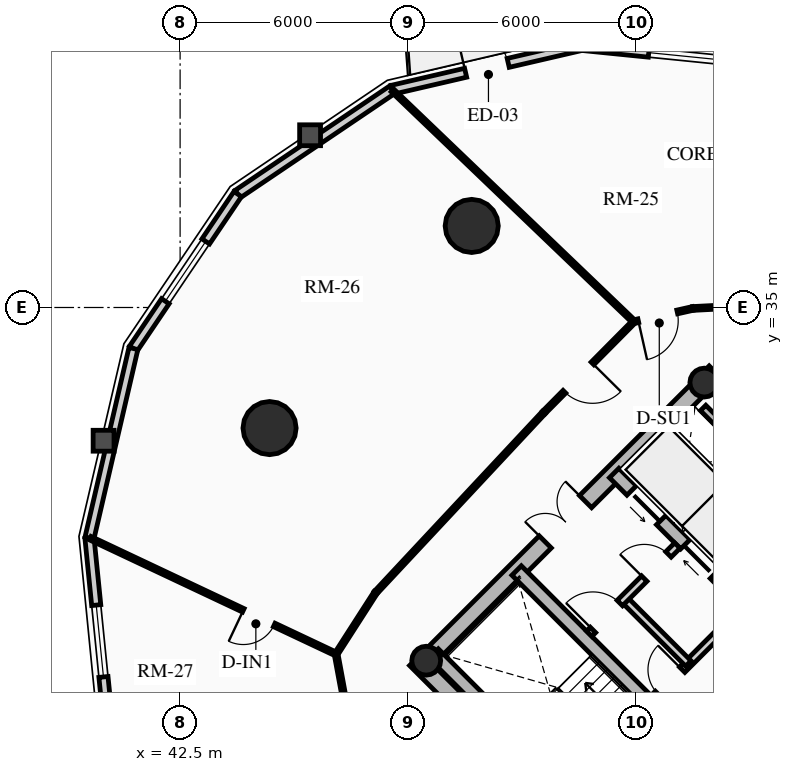
"""IFC4 building model, lengths in metres.
Left out: names, types, materials, properties, quantities, classifications, styles, units other than length and angle.
Written with IfcOpenShell. Run it as: python <this file> out.ifc"""

import sys

from ifc_helpers import new_model, si_unit, direction, frame, frame_2d, origin, origin_2d, place, context, subcontext, project, spatial, rectangle, circle, hollow_circle, extrude, source, transform, mapped, element, fill, save


model = new_model("IFC4")
c1 = context("Model", 3, precision=1e-05, world=origin(), true_north=direction((0.0, 1.0)))
c2 = subcontext(c1, "Body", "Model", "MODEL_VIEW")
j1 = project(units=[si_unit("LENGTHUNIT", "METRE"), si_unit("PLANEANGLEUNIT", "RADIAN")], contexts=[c1])
p1 = place(None, origin())
s1 = spatial("IfcSite", under=j1, at=p1, CompositionType="ELEMENT")
p2 = place(p1, origin())
s2 = spatial("IfcBuilding", under=s1, at=p2, CompositionType="ELEMENT")
p3 = place(p2, frame((0.0, 0.0, 96.34)))
s3 = spatial("IfcBuildingStorey", under=s2, at=p3, CompositionType="ELEMENT", Elevation=96.34)
for number, where, z_axis, x_axis in (
    (1, (58.737, 15.697, 0.0), (0.0, 0.0, 1.0), (-0.707, 0.707, 0.0)),
    (2, (66.303, 23.263, 0.0), (0.0, 0.0, 1.0), (-0.707, 0.707, 0.0)),
):
    element("IfcWall", number, at=place(p3, frame(where, z_axis=z_axis, x_axis=x_axis)), inside=s3, PredefinedType="SHEAR", context=c2, shape_type="SweptSolid", body=[
        extrude(rectangle(XDim=14.2, YDim=0.45, at=frame_2d((7.1, 0.0))), origin(), (0.0, 0.0, 1.0), 2.91),
    ])
p4 = place(p3, frame((48.856, 25.578, 0.0), z_axis=(0.0, 0.0, 1.0), x_axis=(0.707106781187, 0.707106781187, 0.0)))
e3 = element("IfcWall", 3, at=p4, inside=s3, PredefinedType="SHEAR", context=c2, shape_type="SweptSolid", body=[
    extrude(rectangle(XDim=10.7, YDim=0.45, at=frame_2d((5.35, 0.0))), origin(), (0.0, 0.0, 1.0), 2.91),
])
m1 = source(origin(), c2, "Body", "SweptSolid", [
    extrude(rectangle(XDim=1.5, YDim=2.02, at=frame_2d((0.75, 1.01))), frame((0.0, 0.235, 0.0), z_axis=(0.0, -1.0, 0.0), x_axis=(1.0, 0.0, 0.0)), (0.0, 0.0, 1.0), 0.47),
])
p5 = place(p4, frame((4.6, 0.0, 0.0)))
e4 = element("IfcOpeningElement", 4, at=p5, cuts=e3, PredefinedType="OPENING", context=c2, shape_type="MappedRepresentation", body=[
    mapped(m1, transform((0.0, 0.0, 0.0), x_axis=(1.0, 0.0, 0.0), y_axis=(0.0, 1.0, 0.0), z_axis=(0.0, 0.0, 1.0), scale=1.0)),
])
p6 = place(p3, frame((61.078, 18.355, 0.0), z_axis=(0.0, 0.0, 1.0), x_axis=(-0.707106781187, 0.707106781187, 0.0)))
e5 = element("IfcWall", 5, at=p6, inside=s3, PredefinedType="SHEAR", context=c2, shape_type="SweptSolid", body=[
    extrude(rectangle(XDim=13.75, YDim=0.35, at=frame_2d((6.875, 0.0))), origin(), (0.0, 0.0, 1.0), 2.91),
])
m2 = source(origin(), c2, "Body", "SweptSolid", [
    extrude(rectangle(XDim=1.1, YDim=2.015, at=frame_2d((0.55, 1.007))), frame((0.0, 0.185, 0.0), z_axis=(0.0, -1.0, 0.0), x_axis=(1.0, 0.0, 0.0)), (0.0, 0.0, 1.0), 0.37),
])
p7 = place(p6, frame((4.875, 0.0, 0.0)))
e6 = element("IfcOpeningElement", 6, at=p7, cuts=e5, PredefinedType="OPENING", context=c2, shape_type="MappedRepresentation", body=[
    mapped(m2, transform((0.0, 0.0, 0.0), x_axis=(1.0, 0.0, 0.0), y_axis=(0.0, 1.0, 0.0), z_axis=(0.0, 0.0, 1.0), scale=1.0)),
])
m3 = source(origin(), c2, "Body", "SweptSolid", [
    extrude(rectangle(XDim=1.15, YDim=2.02, at=frame_2d((0.575, 1.01))), frame((0.0, 0.185, 0.0), z_axis=(0.0, -1.0, 0.0), x_axis=(1.0, 0.0, 0.0)), (0.0, 0.0, 1.0), 0.37),
])
p8 = place(p6, frame((7.295, 0.0, 0.0)))
e7 = element("IfcOpeningElement", 7, at=p8, cuts=e5, PredefinedType="OPENING", context=c2, shape_type="MappedRepresentation", body=[
    mapped(m3, transform((0.0, 0.0, 0.0), x_axis=(1.0, 0.0, 0.0), y_axis=(0.0, 1.0, 0.0), z_axis=(0.0, 0.0, 1.0), scale=1.0)),
])
p9 = place(p3, frame((63.645, 20.922, 0.0), z_axis=(0.0, 0.0, 1.0), x_axis=(-0.707106781187, 0.707106781187, 0.0)))
e8 = element("IfcWall", 8, at=p9, inside=s3, PredefinedType="SHEAR", context=c2, shape_type="SweptSolid", body=[
    extrude(rectangle(XDim=13.75, YDim=0.35, at=frame_2d((6.875, 0.0))), origin(), (0.0, 0.0, 1.0), 2.91),
])
p10 = place(p9, frame((10.0, 0.0, 0.0)))
e9 = element("IfcOpeningElement", 9, at=p10, cuts=e8, PredefinedType="OPENING", context=c2, shape_type="MappedRepresentation", body=[
    mapped(m2, transform((0.0, 0.0, 0.0), x_axis=(1.0, 0.0, 0.0), y_axis=(0.0, 1.0, 0.0), z_axis=(0.0, 0.0, 1.0), scale=1.0)),
])
p11 = place(p9, frame((12.0, 0.0, 0.0)))
e10 = element("IfcOpeningElement", 10, at=p11, cuts=e8, PredefinedType="OPENING", context=c2, shape_type="MappedRepresentation", body=[
    mapped(m2, transform((0.0, 0.0, 0.0), x_axis=(1.0, 0.0, 0.0), y_axis=(0.0, 1.0, 0.0), z_axis=(0.0, 0.0, 1.0), scale=1.0)),
])
p12 = place(p9, frame((5.305, 0.0, 0.0)))
e11 = element("IfcOpeningElement", 11, at=p12, cuts=e8, PredefinedType="OPENING", context=c2, shape_type="MappedRepresentation", body=[
    mapped(m3, transform((0.0, 0.0, 0.0), x_axis=(1.0, 0.0, 0.0), y_axis=(0.0, 1.0, 0.0), z_axis=(0.0, 0.0, 1.0), scale=1.0)),
])
p13 = place(p3, frame((53.922, 21.141, 0.0), z_axis=(0.0, 0.0, 1.0), x_axis=(-0.707088616009, 0.707124945897, 0.0)))
e12 = element("IfcWall", 12, at=p13, inside=s3, PredefinedType="SHEAR", context=c2, shape_type="SweptSolid", body=[
    extrude(rectangle(XDim=6.72, YDim=0.35, at=frame_2d((3.36, 0.0))), origin(), (0.0, 0.0, 1.0), 2.91),
])
for number, where, z_axis, x_axis in (
    (13, (48.976, 25.706, 0.0), (0.0, 0.0, 1.0), (0.707, 0.707, 0.0)),
    (14, (56.294, 33.024, 0.0), (0.0, 0.0, 1.0), (0.707, 0.707, 0.0)),
):
    element("IfcColumn", number, at=place(p3, frame(where, z_axis=z_axis, x_axis=x_axis)), inside=s3, PredefinedType="COLUMN", context=c2, shape_type="SweptSolid", body=[
        extrude(hollow_circle(Radius=0.38, WallThickness=0.032, at=origin_2d()), origin(), (0.0, 0.0, 1.0), 2.91),
    ])
for number, where, z_axis, x_axis in (
    (15, (50.173, 37.146, 0.0), (0.0, 0.0, 1.0), (1.0, 0.0, 0.0)),
    (16, (44.854, 31.827, 0.0), (0.0, 0.0, 1.0), (1.0, 0.0, 0.0)),
):
    element("IfcColumn", number, at=place(p3, frame(where, z_axis=z_axis, x_axis=x_axis)), inside=s3, PredefinedType="USERDEFINED", context=c2, shape_type="SweptSolid", body=[
        extrude(circle(Radius=0.7, at=origin_2d()), origin(), (0.0, 0.0, 1.0), 2.91),
    ])
p14 = place(p3, frame((53.067, 41.885, 0.0), z_axis=(0.0, 0.0, 1.0), x_axis=(0.994971754311, -0.10015591906, 0.0)))
e17 = element("IfcWall", 17, at=p14, inside=s3, PredefinedType="SOLIDWALL", context=c2, shape_type="SweptSolid", body=[
    extrude(rectangle(XDim=5.448, YDim=0.24, at=frame_2d((2.724, 0.0))), origin(), (0.0, 0.0, 1.0), 2.179),
])
m4 = source(origin(), c2, "Body", "SweptSolid", [
    extrude(rectangle(XDim=1.9, YDim=1.35, at=frame_2d((0.95, 0.675))), frame((0.0, 0.13, 0.0), z_axis=(0.0, -1.0, 0.0), x_axis=(1.0, 0.0, 0.0)), (0.0, 0.0, 1.0), 0.26),
])
p15 = place(p14, frame((1.774, 0.0, 0.65)))
e18 = element("IfcOpeningElement", 18, at=p15, cuts=e17, PredefinedType="OPENING", context=c2, shape_type="MappedRepresentation", body=[
    mapped(m4, transform((0.0, 0.0, 0.0), x_axis=(1.0, 0.0, 0.0), y_axis=(0.0, 1.0, 0.0), z_axis=(0.0, 0.0, 1.0), scale=1.0)),
])
p16 = place(p3, frame((48.08, 40.729, 0.0), z_axis=(0.0, 0.0, 1.0), x_axis=(0.974165631126, 0.225834725257, 0.0)))
e19 = element("IfcWall", 19, at=p16, inside=s3, PredefinedType="SOLIDWALL", context=c2, shape_type="SweptSolid", body=[
    extrude(rectangle(XDim=5.119, YDim=0.24, at=frame_2d((2.56, 0.0))), origin(), (0.0, 0.0, 1.0), 2.179),
])
m5 = source(origin(), c2, "Body", "SweptSolid", [
    extrude(rectangle(XDim=1.15, YDim=2.005, at=frame_2d((0.575, 1.002))), frame((0.0, 0.13, 0.0), z_axis=(0.0, -1.0, 0.0), x_axis=(1.0, 0.0, 0.0)), (0.0, 0.0, 1.0), 0.26),
])
p17 = place(p16, frame((1.984, 0.0, 0.0)))
e20 = element("IfcOpeningElement", 20, at=p17, cuts=e19, PredefinedType="OPENING", context=c2, shape_type="MappedRepresentation", body=[
    mapped(m5, transform((0.0, 0.0, 0.0), x_axis=(1.0, 0.0, 0.0), y_axis=(0.0, 1.0, 0.0), z_axis=(0.0, 0.0, 1.0), scale=1.0)),
])
p18 = place(p3, frame((44.015, 37.985, 0.0), z_axis=(0.0, 0.0, 1.0), x_axis=(0.828781148131, 0.559572880421, 0.0)))
e21 = element("IfcWall", 21, at=p18, inside=s3, PredefinedType="SOLIDWALL", context=c2, shape_type="SweptSolid", body=[
    extrude(rectangle(XDim=4.905, YDim=0.24, at=frame_2d((2.452, 0.0))), origin(), (0.0, 0.0, 1.0), 2.179),
])
p19 = place(p3, frame((41.271, 33.92, 0.0), z_axis=(0.0, 0.0, 1.0), x_axis=(0.559572880421, 0.828781148131, 0.0)))
e22 = element("IfcWall", 22, at=p19, inside=s3, PredefinedType="SOLIDWALL", context=c2, shape_type="SweptSolid", body=[
    extrude(rectangle(XDim=4.905, YDim=0.24, at=frame_2d((2.452, 0.0))), origin(), (0.0, 0.0, 1.0), 2.179),
])
p20 = place(p19, frame((1.502, 0.0, 0.65)))
e23 = element("IfcOpeningElement", 23, at=p20, cuts=e22, PredefinedType="OPENING", context=c2, shape_type="MappedRepresentation", body=[
    mapped(m4, transform((0.0, 0.0, 0.0), x_axis=(1.0, 0.0, 0.0), y_axis=(0.0, 1.0, 0.0), z_axis=(0.0, 0.0, 1.0), scale=1.0)),
])
p21 = place(p3, frame((40.115, 28.933, 0.0), z_axis=(0.0, 0.0, 1.0), x_axis=(0.225834725257, 0.974165631126, 0.0)))
e24 = element("IfcWall", 24, at=p21, inside=s3, PredefinedType="SOLIDWALL", context=c2, shape_type="SweptSolid", body=[
    extrude(rectangle(XDim=5.119, YDim=0.24, at=frame_2d((2.56, 0.0))), origin(), (0.0, 0.0, 1.0), 2.179),
])
p22 = place(p3, frame((40.661, 23.513, 0.0), z_axis=(0.0, 0.0, 1.0), x_axis=(-0.10015591906, 0.994971754311, 0.0)))
e25 = element("IfcWall", 25, at=p22, inside=s3, PredefinedType="SOLIDWALL", context=c2, shape_type="SweptSolid", body=[
    extrude(rectangle(XDim=5.448, YDim=0.24, at=frame_2d((2.724, 0.0))), origin(), (0.0, 0.0, 1.0), 2.179),
])
p23 = place(p22, frame((1.774, 0.0, 0.65)))
e26 = element("IfcOpeningElement", 26, at=p23, cuts=e25, PredefinedType="OPENING", context=c2, shape_type="MappedRepresentation", body=[
    mapped(m4, transform((0.0, 0.0, 0.0), x_axis=(1.0, 0.0, 0.0), y_axis=(0.0, 1.0, 0.0), z_axis=(0.0, 0.0, 1.0), scale=1.0)),
])
p24 = place(p3, frame((55.615, 29.227, 0.0), z_axis=(0.0, 0.0, 1.0), x_axis=(0.707147878904, 0.70706568108, 0.0)))
e27 = element("IfcWall", 27, at=p24, inside=s3, PredefinedType="SHEAR", context=c2, shape_type="SweptSolid", body=[
    extrude(rectangle(XDim=2.97, YDim=0.2, at=frame_2d((1.485, 0.0))), origin(), (0.0, 0.0, 1.0), 2.91),
])
p25 = place(p3, frame((57.419, 31.2, 0.0), z_axis=(0.0, 0.0, 1.0), x_axis=(-0.707032117043, 0.707181437447, 0.0)))
e28 = element("IfcWall", 28, at=p25, inside=s3, PredefinedType="SHEAR", context=c2, shape_type="SweptSolid", body=[
    extrude(rectangle(XDim=1.635, YDim=0.2, at=frame_2d((0.817, 0.0))), origin(), (0.0, 0.0, 1.0), 2.91),
])
p26 = place(p3, frame((54.961, 24.719, 0.0), z_axis=(0.0, 0.0, 1.0), x_axis=(0.707106781187, 0.707106781187, 0.0)))
e29 = element("IfcWall", 29, at=p26, inside=s3, PredefinedType="PARTITIONING", context=c2, shape_type="SweptSolid", body=[
    extrude(rectangle(XDim=3.28, YDim=0.2, at=frame_2d((1.64, 0.0))), origin(), (0.0, 0.0, 1.0), 2.655),
])
m6 = source(origin(), c2, "Body", "SweptSolid", [
    extrude(rectangle(XDim=0.9, YDim=2.005, at=frame_2d((0.45, 1.002))), frame((0.0, 0.11, 0.0), z_axis=(0.0, -1.0, 0.0), x_axis=(1.0, 0.0, 0.0)), (0.0, 0.0, 1.0), 0.22),
])
p27 = place(p26, frame((0.16, 0.0, 0.0)))
e30 = element("IfcOpeningElement", 30, at=p27, cuts=e29, PredefinedType="OPENING", context=c2, shape_type="MappedRepresentation", body=[
    mapped(m6, transform((0.0, 0.0, 0.0), x_axis=(1.0, 0.0, 0.0), y_axis=(0.0, 1.0, 0.0), z_axis=(0.0, 0.0, 1.0), scale=1.0)),
])
p28 = place(p3, frame((55.874, 25.631, 0.0), z_axis=(0.0, 0.0, 1.0), x_axis=(-0.707157639372, 0.707055919343, 0.0)))
e31 = element("IfcWall", 31, at=p28, inside=s3, PredefinedType="PARTITIONING", context=c2, shape_type="SweptSolid", body=[
    extrude(rectangle(XDim=2.4, YDim=0.2, at=frame_2d((1.2, 0.0))), origin(), (0.0, 0.0, 1.0), 2.655),
])
p29 = place(p3, frame((53.264, 26.416, 0.0), z_axis=(0.0, 0.0, 1.0), x_axis=(0.707106781187, 0.707106781187, 0.0)))
e32 = element("IfcWall", 32, at=p29, inside=s3, PredefinedType="PARTITIONING", context=c2, shape_type="SweptSolid", body=[
    extrude(rectangle(XDim=3.28, YDim=0.2, at=frame_2d((1.64, 0.0))), origin(), (0.0, 0.0, 1.0), 2.655),
])
m7 = source(origin(), c2, "Body", "SweptSolid", [
    extrude(rectangle(XDim=1.0, YDim=2.015, at=frame_2d((0.5, 1.007))), frame((0.0, 0.11, 0.0), z_axis=(0.0, -1.0, 0.0), x_axis=(1.0, 0.0, 0.0)), (0.0, 0.0, 1.0), 0.22),
])
p30 = place(p29, frame((0.14, 0.0, 0.0)))
e33 = element("IfcOpeningElement", 33, at=p30, cuts=e32, PredefinedType="OPENING", context=c2, shape_type="MappedRepresentation", body=[
    mapped(m7, transform((0.0, 0.0, 0.0), x_axis=(1.0, 0.0, 0.0), y_axis=(0.0, 1.0, 0.0), z_axis=(0.0, 0.0, 1.0), scale=1.0)),
])
p31 = place(p29, frame((2.05, 0.0, 0.0)))
e34 = element("IfcOpeningElement", 34, at=p31, cuts=e32, PredefinedType="OPENING", context=c2, shape_type="MappedRepresentation", body=[
    mapped(m6, transform((0.0, 0.0, 0.0), x_axis=(1.0, 0.0, 0.0), y_axis=(0.0, 1.0, 0.0), z_axis=(0.0, 0.0, 1.0), scale=1.0)),
])
p32 = place(p3, frame((57.462, 35.05, 0.0), z_axis=(0.0, 0.0, 1.0), x_axis=(-0.998677016607, -0.051421945723, 0.0)))
e35 = element("IfcWall", 35, at=p32, inside=s3, PredefinedType="MOVABLE", context=c2, shape_type="SweptSolid", body=[
    extrude(rectangle(XDim=1.477, YDim=0.1, at=frame_2d((0.738, 0.0))), origin(), (0.0, 0.0, 1.0), 2.225),
])
p33 = place(p3, frame((55.988, 34.974, 0.0), z_axis=(0.0, 0.0, 1.0), x_axis=(-0.975666565154, -0.219259557695, 0.0)))
e36 = element("IfcWall", 36, at=p33, inside=s3, PredefinedType="MOVABLE", context=c2, shape_type="SweptSolid", body=[
    extrude(rectangle(XDim=1.587, YDim=0.1, at=frame_2d((0.793, 0.0))), origin(), (0.0, 0.0, 1.0), 2.225),
])
m8 = source(origin(), c2, "Body", "SweptSolid", [
    extrude(rectangle(XDim=1.05, YDim=2.015, at=frame_2d((0.525, 1.007))), frame((0.0, 0.06, 0.0), z_axis=(0.0, -1.0, 0.0), x_axis=(1.0, 0.0, 0.0)), (0.0, 0.0, 1.0), 0.12),
])
p34 = place(p33, frame((0.417, 0.0, 0.0)))
e37 = element("IfcOpeningElement", 37, at=p34, cuts=e36, PredefinedType="OPENING", context=c2, shape_type="MappedRepresentation", body=[
    mapped(m8, transform((0.0, 0.0, 0.0), x_axis=(1.0, 0.0, 0.0), y_axis=(0.0, 1.0, 0.0), z_axis=(0.0, 0.0, 1.0), scale=1.0)),
])
p35 = place(p3, frame((54.44, 34.626, 0.0), z_axis=(0.0, 0.0, 1.0), x_axis=(-0.703978840546, -0.710220945948, 0.0)))
e38 = element("IfcWall", 38, at=p35, inside=s3, PredefinedType="MOVABLE", context=c2, shape_type="SweptSolid", body=[
    extrude(rectangle(XDim=3.364, YDim=0.1, at=frame_2d((1.682, 0.0))), origin(), (0.0, 0.0, 1.0), 2.225),
])
p36 = place(p35, frame((1.546, 0.0, 0.0)))
e39 = element("IfcOpeningElement", 39, at=p36, cuts=e38, PredefinedType="OPENING", context=c2, shape_type="MappedRepresentation", body=[
    mapped(m8, transform((0.0, 0.0, 0.0), x_axis=(1.0, 0.0, 0.0), y_axis=(0.0, 1.0, 0.0), z_axis=(0.0, 0.0, 1.0), scale=1.0)),
])
p37 = place(p3, frame((52.072, 32.237, 0.0), z_axis=(0.0, 0.0, 1.0), x_axis=(-0.682528774423, -0.730858722383, 0.0)))
e40 = element("IfcWall", 40, at=p37, inside=s3, PredefinedType="MOVABLE", context=c2, shape_type="SweptSolid", body=[
    extrude(rectangle(XDim=6.486, YDim=0.1, at=frame_2d((3.243, 0.0))), origin(), (0.0, 0.0, 1.0), 2.225),
])
p38 = place(p3, frame((47.645, 27.497, 0.0), z_axis=(0.0, 0.0, 1.0), x_axis=(-0.540680612097, -0.841227957038, 0.0)))
e41 = element("IfcWall", 41, at=p38, inside=s3, PredefinedType="MOVABLE", context=c2, shape_type="SweptSolid", body=[
    extrude(rectangle(XDim=1.924, YDim=0.1, at=frame_2d((0.962, 0.0))), origin(), (0.0, 0.0, 1.0), 2.225),
])
p39 = place(p3, frame((46.605, 25.879, 0.0), z_axis=(0.0, 0.0, 1.0), x_axis=(0.182019785456, -0.983294868136, 0.0)))
e42 = element("IfcWall", 42, at=p39, inside=s3, PredefinedType="MOVABLE", context=c2, shape_type="SweptSolid", body=[
    extrude(rectangle(XDim=1.384, YDim=0.1, at=frame_2d((0.692, 0.0))), origin(), (0.0, 0.0, 1.0), 2.225),
])
p40 = place(p3, frame((54.44, 34.626, 0.0), z_axis=(0.0, 0.0, 1.0), x_axis=(-0.722045979822, 0.691845071547, 0.0)))
e43 = element("IfcWall", 43, at=p40, inside=s3, PredefinedType="MOVABLE", context=c2, shape_type="SweptSolid", body=[
    extrude(rectangle(XDim=8.795, YDim=0.1, at=frame_2d((4.397, 0.0))), origin(), (0.0, 0.0, 1.0), 2.179),
])
p41 = place(p3, frame((46.605, 25.879, 0.0), z_axis=(0.0, 0.0, 1.0), x_axis=(-0.904450971726, 0.426577589359, 0.0)))
e44 = element("IfcWall", 44, at=p41, inside=s3, PredefinedType="MOVABLE", context=c2, shape_type="SweptSolid", body=[
    extrude(rectangle(XDim=7.154, YDim=0.1, at=frame_2d((3.577, 0.0))), origin(), (0.0, 0.0, 1.0), 2.179),
])
m9 = source(origin(), c2, "Body", "SweptSolid", [
    extrude(rectangle(XDim=0.9, YDim=2.005, at=frame_2d((0.45, 1.002))), frame((0.0, 0.06, 0.0), z_axis=(0.0, -1.0, 0.0), x_axis=(1.0, 0.0, 0.0)), (0.0, 0.0, 1.0), 0.12),
])
p42 = place(p41, frame((1.8, 0.0, 0.0)))
e45 = element("IfcOpeningElement", 45, at=p42, cuts=e44, PredefinedType="OPENING", context=c2, shape_type="MappedRepresentation", body=[
    mapped(m9, transform((0.0, 0.0, 0.0), x_axis=(1.0, 0.0, 0.0), y_axis=(0.0, 1.0, 0.0), z_axis=(0.0, 0.0, 1.0), scale=1.0)),
])
m10 = source(origin(), c2, "Body", "SweptSolid", [
    extrude(rectangle(XDim=1.9, YDim=1.35, at=frame_2d((0.95, 0.675))), frame((0.0, 0.03, 0.0), z_axis=(0.0, -1.0, 0.0), x_axis=(1.0, 0.0, 0.0)), (0.0, 0.0, 1.0), 0.06),
])
p43 = place(p15, origin())
e46 = element("IfcWindow", 46, at=p43, inside=s3, PartitioningType="DOUBLE_PANEL_VERTICAL", PredefinedType="WINDOW", context=c2, shape_type="MappedRepresentation", body=[
    mapped(m10, transform((0.0, 0.0, 0.0), x_axis=(1.0, 0.0, 0.0), y_axis=(0.0, 1.0, 0.0), z_axis=(0.0, 0.0, 1.0), scale=1.0)),
])
fill(e18, e46)
m11 = source(origin(), c2, "Body", "SweptSolid", [
    extrude(rectangle(XDim=1.15, YDim=2.005, at=frame_2d((0.575, 1.002))), frame((0.0, 0.025, 0.0), z_axis=(0.0, -1.0, 0.0), x_axis=(1.0, 0.0, 0.0)), (0.0, 0.0, 1.0), 0.05),
])
p44 = place(p17, origin())
e47 = element("IfcDoor", 47, at=p44, inside=s3, OperationType="SINGLE_SWING_LEFT", PredefinedType="DOOR", context=c2, shape_type="MappedRepresentation", body=[
    mapped(m11, transform((0.0, 0.0, 0.0), x_axis=(1.0, 0.0, 0.0), y_axis=(0.0, 1.0, 0.0), z_axis=(0.0, 0.0, 1.0), scale=1.0)),
])
fill(e20, e47)
p45 = place(p20, origin())
e48 = element("IfcWindow", 48, at=p45, inside=s3, PartitioningType="DOUBLE_PANEL_VERTICAL", PredefinedType="WINDOW", context=c2, shape_type="MappedRepresentation", body=[
    mapped(m10, transform((0.0, 0.0, 0.0), x_axis=(1.0, 0.0, 0.0), y_axis=(0.0, 1.0, 0.0), z_axis=(0.0, 0.0, 1.0), scale=1.0)),
])
fill(e23, e48)
p46 = place(p23, origin())
e49 = element("IfcWindow", 49, at=p46, inside=s3, PartitioningType="DOUBLE_PANEL_VERTICAL", PredefinedType="WINDOW", context=c2, shape_type="MappedRepresentation", body=[
    mapped(m10, transform((0.0, 0.0, 0.0), x_axis=(1.0, 0.0, 0.0), y_axis=(0.0, 1.0, 0.0), z_axis=(0.0, 0.0, 1.0), scale=1.0)),
])
fill(e26, e49)
m12 = source(origin(), c2, "Body", "SweptSolid", [
    extrude(rectangle(XDim=1.1, YDim=2.015, at=frame_2d((0.55, 1.007))), frame((0.0, 0.025, 0.0), z_axis=(0.0, -1.0, 0.0), x_axis=(1.0, 0.0, 0.0)), (0.0, 0.0, 1.0), 0.05),
])
p47 = place(p10, origin())
e50 = element("IfcDoor", 50, at=p47, inside=s3, OperationType="SLIDING_TO_RIGHT", PredefinedType="DOOR", context=c2, shape_type="MappedRepresentation", body=[
    mapped(m12, transform((0.0, 0.0, 0.0), x_axis=(1.0, 0.0, 0.0), y_axis=(0.0, 1.0, 0.0), z_axis=(0.0, 0.0, 1.0), scale=1.0)),
])
fill(e9, e50)
p48 = place(p11, origin())
e51 = element("IfcDoor", 51, at=p48, inside=s3, OperationType="SLIDING_TO_LEFT", PredefinedType="DOOR", context=c2, shape_type="MappedRepresentation", body=[
    mapped(m12, transform((0.0, 0.0, 0.0), x_axis=(1.0, 0.0, 0.0), y_axis=(0.0, 1.0, 0.0), z_axis=(0.0, 0.0, 1.0), scale=1.0)),
])
fill(e10, e51)
m13 = source(origin(), c2, "Body", "SweptSolid", [
    extrude(rectangle(XDim=1.5, YDim=2.02, at=frame_2d((0.75, 1.01))), frame((0.0, 0.025, 0.0), z_axis=(0.0, -1.0, 0.0), x_axis=(1.0, 0.0, 0.0)), (0.0, 0.0, 1.0), 0.05),
])
p49 = place(p5, origin())
e52 = element("IfcDoor", 52, at=p49, inside=s3, OperationType="DOUBLE_DOOR_SINGLE_SWING", PredefinedType="DOOR", context=c2, shape_type="MappedRepresentation", body=[
    mapped(m13, transform((0.0, 0.0, 0.0), x_axis=(1.0, 0.0, 0.0), y_axis=(0.0, 1.0, 0.0), z_axis=(0.0, 0.0, 1.0), scale=1.0)),
])
fill(e4, e52)
m14 = source(origin(), c2, "Body", "SweptSolid", [
    extrude(rectangle(XDim=0.9, YDim=2.005, at=frame_2d((0.45, 1.002))), frame((0.0, 0.025, 0.0), z_axis=(0.0, -1.0, 0.0), x_axis=(1.0, 0.0, 0.0)), (0.0, 0.0, 1.0), 0.05),
])
p50 = place(p27, origin())
e53 = element("IfcDoor", 53, at=p50, inside=s3, OperationType="SINGLE_SWING_RIGHT", PredefinedType="DOOR", context=c2, shape_type="MappedRepresentation", body=[
    mapped(m14, transform((0.0, 0.0, 0.0), x_axis=(1.0, 0.0, 0.0), y_axis=(0.0, 1.0, 0.0), z_axis=(0.0, 0.0, 1.0), scale=1.0)),
])
fill(e30, e53)
m15 = source(origin(), c2, "Body", "SweptSolid", [
    extrude(rectangle(XDim=1.0, YDim=2.015, at=frame_2d((0.5, 1.007))), frame((0.0, 0.025, 0.0), z_axis=(0.0, -1.0, 0.0), x_axis=(1.0, 0.0, 0.0)), (0.0, 0.0, 1.0), 0.05),
])
p51 = place(p30, origin())
e54 = element("IfcDoor", 54, at=p51, inside=s3, OperationType="SINGLE_SWING_LEFT", PredefinedType="DOOR", context=c2, shape_type="MappedRepresentation", body=[
    mapped(m15, transform((0.0, 0.0, 0.0), x_axis=(1.0, 0.0, 0.0), y_axis=(0.0, 1.0, 0.0), z_axis=(0.0, 0.0, 1.0), scale=1.0)),
])
fill(e33, e54)
p52 = place(p31, origin())
e55 = element("IfcDoor", 55, at=p52, inside=s3, OperationType="SINGLE_SWING_LEFT", PredefinedType="DOOR", context=c2, shape_type="MappedRepresentation", body=[
    mapped(m14, transform((0.0, 0.0, 0.0), x_axis=(1.0, 0.0, 0.0), y_axis=(0.0, 1.0, 0.0), z_axis=(0.0, 0.0, 1.0), scale=1.0)),
])
fill(e34, e55)
m16 = source(origin(), c2, "Body", "SweptSolid", [
    extrude(rectangle(XDim=1.05, YDim=2.015, at=frame_2d((0.525, 1.007))), frame((0.0, 0.025, 0.0), z_axis=(0.0, -1.0, 0.0), x_axis=(1.0, 0.0, 0.0)), (0.0, 0.0, 1.0), 0.05),
])
p53 = place(p34, origin())
e56 = element("IfcDoor", 56, at=p53, inside=s3, OperationType="SINGLE_SWING_RIGHT", PredefinedType="DOOR", context=c2, shape_type="MappedRepresentation", body=[
    mapped(m16, transform((0.0, 0.0, 0.0), x_axis=(1.0, 0.0, 0.0), y_axis=(0.0, 1.0, 0.0), z_axis=(0.0, 0.0, 1.0), scale=1.0)),
])
fill(e37, e56)
p54 = place(p36, origin())
e57 = element("IfcDoor", 57, at=p54, inside=s3, OperationType="SINGLE_SWING_LEFT", PredefinedType="DOOR", context=c2, shape_type="MappedRepresentation", body=[
    mapped(m16, transform((0.0, 0.0, 0.0), x_axis=(1.0, 0.0, 0.0), y_axis=(0.0, 1.0, 0.0), z_axis=(0.0, 0.0, 1.0), scale=1.0)),
])
fill(e39, e57)
p55 = place(p42, origin())
e58 = element("IfcDoor", 58, at=p55, inside=s3, OperationType="SINGLE_SWING_RIGHT", PredefinedType="DOOR", context=c2, shape_type="MappedRepresentation", body=[
    mapped(m14, transform((0.0, 0.0, 0.0), x_axis=(1.0, 0.0, 0.0), y_axis=(0.0, 1.0, 0.0), z_axis=(0.0, 0.0, 1.0), scale=1.0)),
])
fill(e45, e58)
save(model, sys.argv[1])
